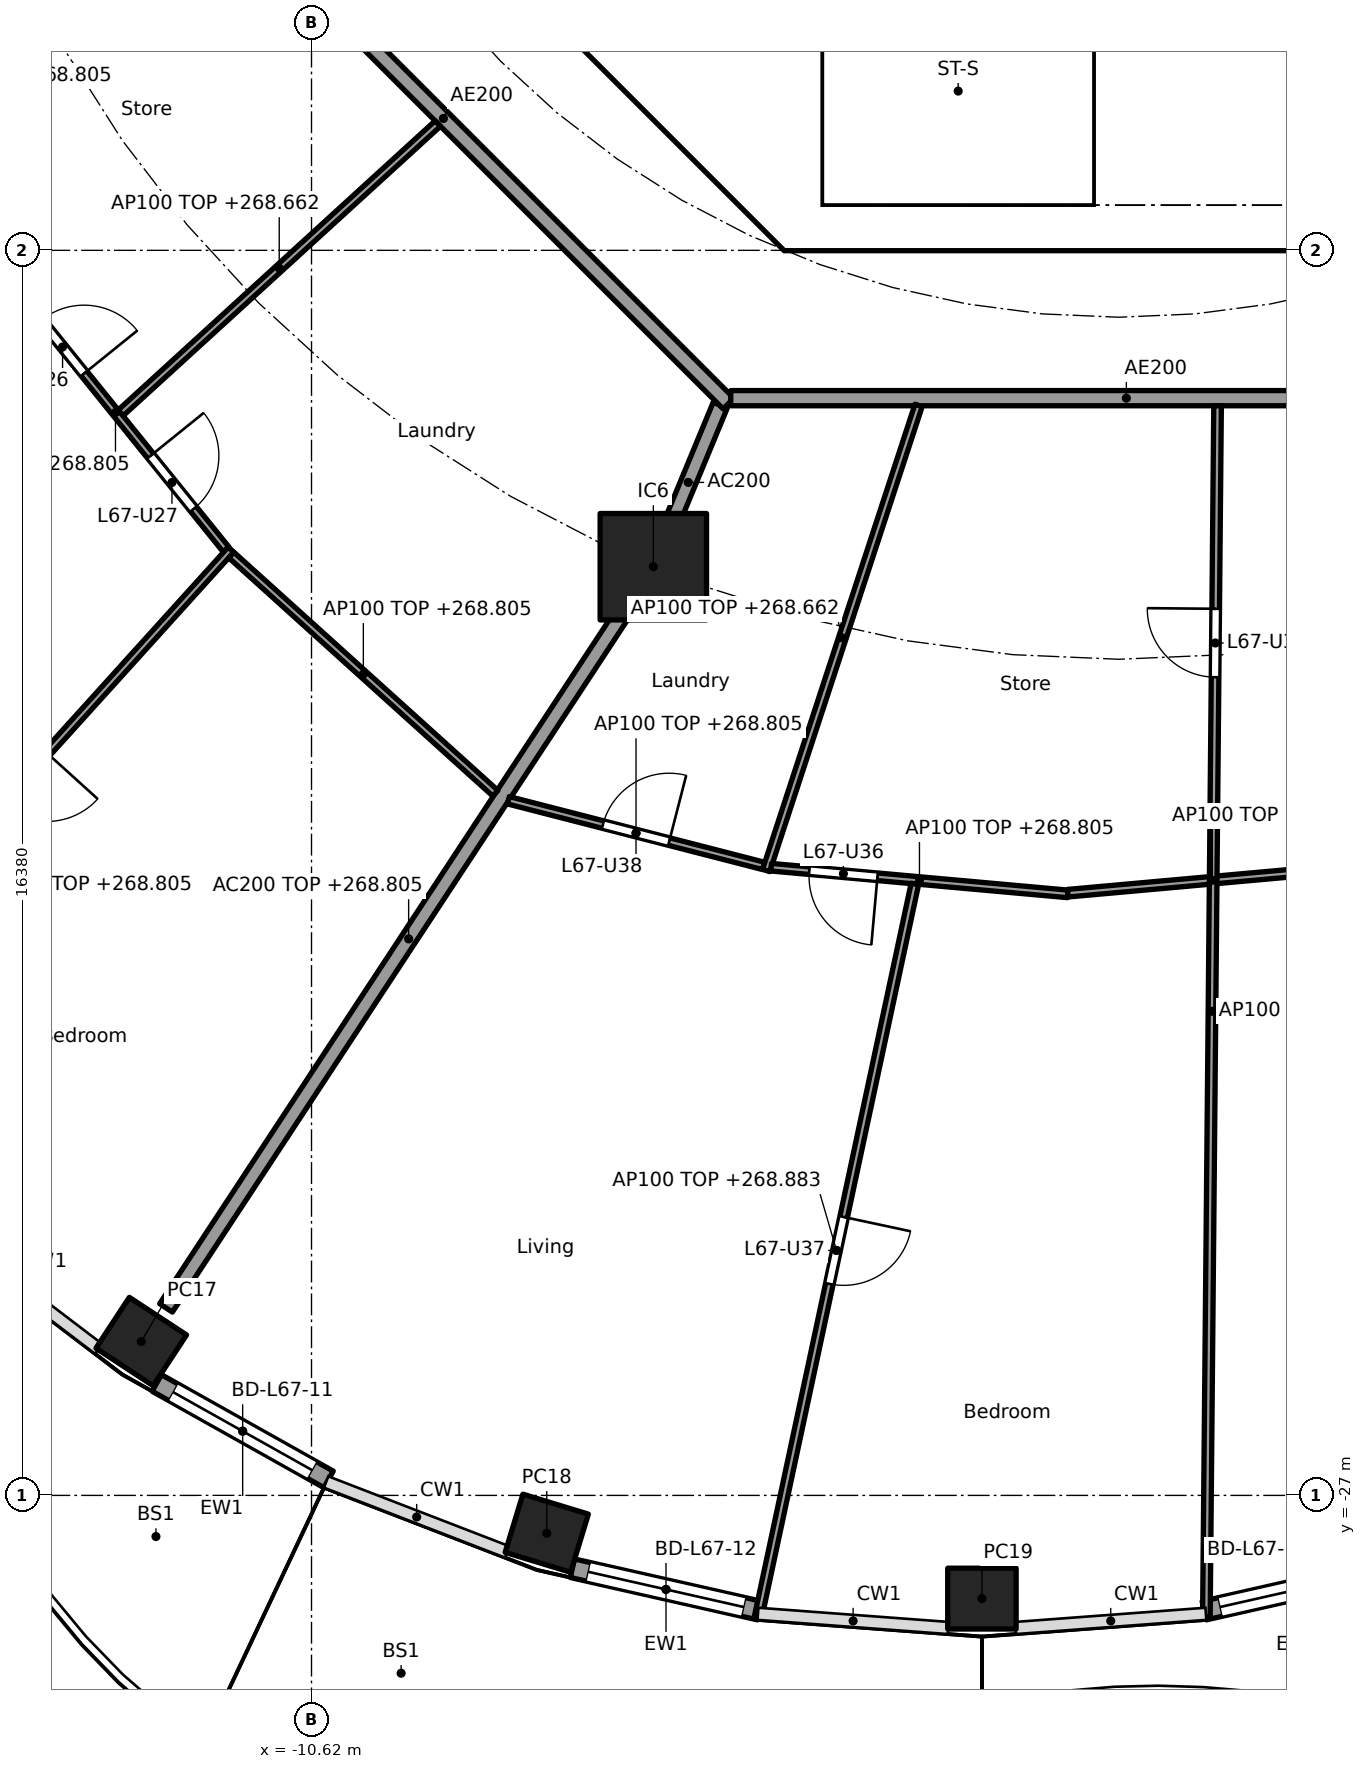
"""IFC4 building model, lengths in metres.
Left out: names, types, materials, properties, quantities, classifications, styles, units other than length and angle.
Written with IfcOpenShell. Run it as: python <this file> out.ifc"""

import sys

from ifc_helpers import new_model, si_unit, direction, frame, frame_2d, origin, origin_2d, place, context, subcontext, project, spatial, polyline, rectangle, hollow_rectangle, outline, extrude, element, fill, save


model = new_model("IFC4")
c1 = context("Model", 3, precision=1e-05, world=origin(), true_north=direction((0.0, 1.0)))
c2 = subcontext(c1, "Body", "Model", "MODEL_VIEW")
j1 = project(units=[si_unit("LENGTHUNIT", "METRE"), si_unit("PLANEANGLEUNIT", "RADIAN")], contexts=[c1])
p1 = place(None, origin())
s1 = spatial("IfcSite", under=j1, at=p1, CompositionType="ELEMENT")
p2 = place(p1, origin())
s2 = spatial("IfcBuilding", under=s1, at=p2, CompositionType="ELEMENT")
p3 = place(p2, frame((0.0, 0.0, 265.9)))
s3 = spatial("IfcBuildingStorey", under=s2, at=p3, CompositionType="ELEMENT", Elevation=265.9)
for number, where, z_axis, x_axis in (
    (1, (-12.86, -24.976, 0.0), (0.0, 0.0, 1.0), (0.836, -0.549, 0.0)),
    (2, (-7.525, -27.498, 0.0), (0.0, 0.0, 1.0), (0.957, -0.292, 0.0)),
    (3, (-1.8, -28.358, 0.0), (0.0, 0.0, 1.0), (1.0, 0.0, 0.0)),
):
    element("IfcColumn", number, at=place(p3, frame(where, z_axis=z_axis, x_axis=x_axis)), inside=s3, PredefinedType="COLUMN", context=c2, shape_type="SweptSolid", body=[
        extrude(hollow_rectangle(XDim=0.9, YDim=0.8, WallThickness=0.028, at=origin_2d()), origin(), (0.0, 0.0, 1.0), 3.7),
    ])
p4 = place(p3, frame((-6.123, -14.782, 0.0), z_axis=(0.0, 0.0, 1.0), x_axis=(1.0, 0.0, 0.0)))
e4 = element("IfcColumn", 4, at=p4, inside=s3, PredefinedType="COLUMN", context=c2, shape_type="SweptSolid", body=[
    extrude(rectangle(XDim=1.4, YDim=1.4, at=origin_2d()), origin(), (0.0, 0.0, 1.0), 3.7),
])
p5 = place(p3, frame((-10.395, -26.789, 0.0), z_axis=(0.0, 0.0, 1.0), x_axis=(-0.872115604046, 0.489299880625, 0.0)))
e5 = element("IfcWall", 5, at=p5, inside=s3, PredefinedType="SOLIDWALL", context=c2, shape_type="SweptSolid", body=[
    extrude(rectangle(XDim=2.593, YDim=0.25, at=frame_2d((1.296, 0.0))), origin(), (0.0, 0.0, 1.0), 3.44),
])
p6 = place(p5, frame((0.247, 0.0, 0.0)))
e6 = element("IfcOpeningElement", 6, at=p6, cuts=e5, PredefinedType="OPENING", context=c2, shape_type="SweptSolid", body=[
    extrude(rectangle(XDim=2.1, YDim=2.4, at=frame_2d((1.05, 1.2))), frame((0.0, 0.135, 0.0), z_axis=(0.0, -1.0, 0.0), x_axis=(1.0, 0.0, 0.0)), (0.0, 0.0, 1.0), 0.27),
])
p7 = place(p3, frame((-4.725, -28.516, 0.0), z_axis=(0.0, 0.0, 1.0), x_axis=(-0.975319584032, 0.220797891756, 0.0)))
e7 = element("IfcWall", 7, at=p7, inside=s3, PredefinedType="SOLIDWALL", context=c2, shape_type="SweptSolid", body=[
    extrude(rectangle(XDim=2.525, YDim=0.25, at=frame_2d((1.263, 0.0))), origin(), (0.0, 0.0, 1.0), 3.44),
])
p8 = place(p7, frame((0.213, 0.0, 0.0)))
e8 = element("IfcOpeningElement", 8, at=p8, cuts=e7, PredefinedType="OPENING", context=c2, shape_type="SweptSolid", body=[
    extrude(rectangle(XDim=2.1, YDim=2.4, at=frame_2d((1.05, 1.2))), frame((0.0, 0.135, 0.0), z_axis=(0.0, -1.0, 0.0), x_axis=(1.0, 0.0, 0.0)), (0.0, 0.0, 1.0), 0.27),
])
p9 = place(p3, frame((3.588, -27.958, 0.0), z_axis=(0.0, 0.0, 1.0), x_axis=(-0.97531487046, -0.22081871175, 0.0)))
e9 = element("IfcWall", 9, at=p9, inside=s3, PredefinedType="SOLIDWALL", context=c2, shape_type="SweptSolid", body=[
    extrude(rectangle(XDim=2.525, YDim=0.25, at=frame_2d((1.263, 0.0))), origin(), (0.0, 0.0, 1.0), 3.44),
])
p10 = place(p9, frame((0.213, 0.0, 0.0)))
e10 = element("IfcOpeningElement", 10, at=p10, cuts=e9, PredefinedType="OPENING", context=c2, shape_type="SweptSolid", body=[
    extrude(rectangle(XDim=2.1, YDim=2.4, at=frame_2d((1.05, 1.2))), frame((0.0, 0.135, 0.0), z_axis=(0.0, -1.0, 0.0), x_axis=(1.0, 0.0, 0.0)), (0.0, 0.0, 1.0), 0.27),
])
p11 = place(p3, frame((-9.988, -4.613, 0.0), z_axis=(0.0, 0.0, 1.0), x_axis=(0.707106781187, -0.707106781187, 0.0)))
e11 = element("IfcWall", 11, at=p11, inside=s3, PredefinedType="SHEAR", context=c2, shape_type="SweptSolid", body=[
    extrude(rectangle(XDim=7.602, YDim=0.6, at=frame_2d((3.801, 0.0))), origin(), (0.0, 0.0, 1.0), 3.44),
])
p12 = place(p11, frame((6.151, 0.0, 0.0)))
e12 = element("IfcOpeningElement", 12, at=p12, cuts=e11, PredefinedType="OPENING", context=c2, shape_type="SweptSolid", body=[
    extrude(rectangle(XDim=1.1, YDim=2.1, at=frame_2d((0.55, 1.05))), frame((0.0, 0.31, 0.0), z_axis=(0.0, -1.0, 0.0), x_axis=(1.0, 0.0, 0.0)), (0.0, 0.0, 1.0), 0.62),
])
p13 = place(p3, frame((-5.8, -8.227, 0.0), z_axis=(0.0, 0.0, 1.0), x_axis=(0.0, 1.0, 0.0)))
e13 = element("IfcWall", 13, at=p13, inside=s3, PredefinedType="PARTITIONING", context=c2, shape_type="SweptSolid", body=[
    extrude(rectangle(XDim=3.927, YDim=0.15, at=frame_2d((1.963, 0.0))), origin(), (0.0, 0.0, 1.0), 3.44),
])
p14 = place(p13, frame((2.615, 0.0, 0.0)))
e14 = element("IfcOpeningElement", 14, at=p14, cuts=e13, PredefinedType="OPENING", context=c2, shape_type="SweptSolid", body=[
    extrude(rectangle(XDim=0.9, YDim=2.1, at=frame_2d((0.45, 1.05))), frame((0.0, 0.085, 0.0), z_axis=(0.0, -1.0, 0.0), x_axis=(1.0, 0.0, 0.0)), (0.0, 0.0, 1.0), 0.17),
])
p15 = place(p13, frame((0.539, 0.0, 0.0)))
e15 = element("IfcOpeningElement", 15, at=p15, cuts=e13, PredefinedType="OPENING", context=c2, shape_type="SweptSolid", body=[
    extrude(rectangle(XDim=0.9, YDim=2.1, at=frame_2d((0.45, 1.05))), frame((0.0, 0.085, 0.0), z_axis=(0.0, -1.0, 0.0), x_axis=(1.0, 0.0, 0.0)), (0.0, 0.0, 1.0), 0.17),
])
p16 = place(p3, origin())
e16 = element("IfcWall", 16, at=p16, inside=s3, PredefinedType="SHEAR", context=c2, shape_type="SweptSolid", body=[
    extrude(outline(polyline([(-4.152, -10.025), (4.152, -10.025), (4.401, -9.776), (4.825, -10.2), (4.401, -10.625), (-4.401, -10.625), (-4.825, -10.2), (-4.401, -9.776), (-4.152, -10.025)])), origin(), (0.0, 0.0, 1.0), 3.44),
])
p17 = place(p3, origin())
e17 = element("IfcWall", 17, at=p17, inside=s3, PredefinedType="SOLIDWALL", context=c2, shape_type="SweptSolid", body=[
    extrude(outline(polyline([(-3.9, -10.025), (-4.1, -10.025), (-4.1, -7.025), (-3.9, -7.025), (-3.9, -10.025)])), origin(), (0.0, 0.0, 1.0), 3.44),
])
p18 = place(p3, frame((-5.243, -12.657, 0.0), z_axis=(0.0, 0.0, 1.0), x_axis=(-0.382770106157, -0.923843626288, 0.0)))
e18 = element("IfcWall", 18, at=p18, inside=s3, PredefinedType="PARTITIONING", context=c2, shape_type="SweptSolid", body=[
    extrude(rectangle(XDim=2.199, YDim=0.2, at=frame_2d((1.1, 0.0))), origin(), (0.0, 0.0, 1.0), 3.44),
])
p19 = place(p3, frame((-6.151, -14.824, 0.0), z_axis=(0.0, 0.0, 1.0), x_axis=(-0.549345577828, -0.835595258556, 0.0)))
e19 = element("IfcWall", 19, at=p19, inside=s3, PredefinedType="PARTITIONING", context=c2, shape_type="SweptSolid", body=[
    extrude(rectangle(XDim=11.62, YDim=0.2, at=frame_2d((5.81, 0.0))), origin(), (0.0, 0.0, 1.0), 2.905),
])
p20 = place(p3, frame((-12.635, -5.134, 0.0), z_axis=(0.0, 0.0, 1.0), x_axis=(0.707106781187, -0.707106781187, 0.0)))
e20 = element("IfcWall", 20, at=p20, inside=s3, PredefinedType="PARTITIONING", context=c2, shape_type="SweptSolid", body=[
    extrude(rectangle(XDim=10.609, YDim=0.2, at=frame_2d((5.305, 0.0))), origin(), (0.0, 0.0, 1.0), 3.44),
])
p21 = place(p3, frame((-5.104, -12.565, 0.0), z_axis=(0.0, 0.0, 1.0), x_axis=(1.0, 0.0, 0.0)))
e21 = element("IfcWall", 21, at=p21, inside=s3, PredefinedType="PARTITIONING", context=c2, shape_type="SweptSolid", body=[
    extrude(rectangle(XDim=10.409, YDim=0.2, at=frame_2d((5.205, 0.0))), origin(), (0.0, 0.0, 1.0), 3.44),
])
p22 = place(p3, frame((-14.654, -10.951, 0.0), z_axis=(0.0, 0.0, 1.0), x_axis=(0.62815308134, -0.778089780426, 0.0)))
e22 = element("IfcWall", 22, at=p22, inside=s3, PredefinedType="PARTITIONING", context=c2, shape_type="SweptSolid", body=[
    extrude(rectangle(XDim=4.633, YDim=0.1, at=frame_2d((2.316, 0.0))), origin(), (0.0, 0.0, 1.0), 2.905),
])
p23 = place(p22, frame((0.758, 0.0, 0.0)))
e23 = element("IfcOpeningElement", 23, at=p23, cuts=e22, PredefinedType="OPENING", context=c2, shape_type="SweptSolid", body=[
    extrude(rectangle(XDim=0.9, YDim=2.1, at=frame_2d((0.45, 1.05))), frame((0.0, 0.06, 0.0), z_axis=(0.0, -1.0, 0.0), x_axis=(1.0, 0.0, 0.0)), (0.0, 0.0, 1.0), 0.12),
])
p24 = place(p22, frame((3.049, 0.0, 0.0)))
e24 = element("IfcOpeningElement", 24, at=p24, cuts=e22, PredefinedType="OPENING", context=c2, shape_type="SweptSolid", body=[
    extrude(rectangle(XDim=0.9, YDim=2.1, at=frame_2d((0.45, 1.05))), frame((0.0, 0.06, 0.0), z_axis=(0.0, -1.0, 0.0), x_axis=(1.0, 0.0, 0.0)), (0.0, 0.0, 1.0), 0.12),
])
p25 = place(p3, frame((-8.958, -8.952, 0.0), z_axis=(0.0, 0.0, 1.0), x_axis=(-0.73876526954, -0.673962815385, 0.0)))
e25 = element("IfcWall", 25, at=p25, inside=s3, PredefinedType="PARTITIONING", context=c2, shape_type="SweptSolid", body=[
    extrude(rectangle(XDim=5.647, YDim=0.1, at=frame_2d((2.824, 0.0))), origin(), (0.0, 0.0, 1.0), 2.762),
])
p26 = place(p3, frame((-11.679, -14.557, 0.0), z_axis=(0.0, 0.0, 1.0), x_axis=(-0.670800011545, -0.741638284146, 0.0)))
e26 = element("IfcWall", 26, at=p26, inside=s3, PredefinedType="PARTITIONING", context=c2, shape_type="SweptSolid", body=[
    extrude(rectangle(XDim=8.068, YDim=0.1, at=frame_2d((4.034, 0.0))), origin(), (0.0, 0.0, 1.0), 2.905),
])
p27 = place(p26, frame((3.609, 0.0, 0.0)))
e27 = element("IfcOpeningElement", 27, at=p27, cuts=e26, PredefinedType="OPENING", context=c2, shape_type="SweptSolid", body=[
    extrude(rectangle(XDim=0.9, YDim=2.1, at=frame_2d((0.45, 1.05))), frame((0.0, 0.06, 0.0), z_axis=(0.0, -1.0, 0.0), x_axis=(1.0, 0.0, 0.0)), (0.0, 0.0, 1.0), 0.12),
])
p28 = place(p3, frame((-11.676, -14.628, 0.0), z_axis=(0.0, 0.0, 1.0), x_axis=(0.74245829867, -0.669892285921, 0.0)))
e28 = element("IfcWall", 28, at=p28, inside=s3, PredefinedType="PARTITIONING", context=c2, shape_type="SweptSolid", body=[
    extrude(rectangle(XDim=4.68, YDim=0.1, at=frame_2d((2.34, 0.0))), origin(), (0.0, 0.0, 1.0), 2.905),
])
p29 = place(p3, frame((-8.03, -17.854, 0.0), z_axis=(0.0, 0.0, 1.0), x_axis=(0.968441967324, -0.249239154077, 0.0)))
e29 = element("IfcWall", 29, at=p29, inside=s3, PredefinedType="PARTITIONING", context=c2, shape_type="SweptSolid", body=[
    extrude(rectangle(XDim=3.468, YDim=0.1, at=frame_2d((1.734, 0.0))), origin(), (0.0, 0.0, 1.0), 2.905),
])
p30 = place(p29, frame((1.284, 0.0, 0.0)))
e30 = element("IfcOpeningElement", 30, at=p30, cuts=e29, PredefinedType="OPENING", context=c2, shape_type="SweptSolid", body=[
    extrude(rectangle(XDim=0.9, YDim=2.1, at=frame_2d((0.45, 1.05))), frame((0.0, 0.06, 0.0), z_axis=(0.0, -1.0, 0.0), x_axis=(1.0, 0.0, 0.0)), (0.0, 0.0, 1.0), 0.12),
])
p31 = place(p3, frame((-2.633, -12.66, 0.0), z_axis=(0.0, 0.0, 1.0), x_axis=(-0.311435053715, -0.950267439891, 0.0)))
e31 = element("IfcWall", 31, at=p31, inside=s3, PredefinedType="PARTITIONING", context=c2, shape_type="SweptSolid", body=[
    extrude(rectangle(XDim=6.439, YDim=0.1, at=frame_2d((3.22, 0.0))), origin(), (0.0, 0.0, 1.0), 2.762),
])
p32 = place(p3, frame((-4.573, -18.736, 0.0), z_axis=(0.0, 0.0, 1.0), x_axis=(0.995984610732, -0.089524606594, 0.0)))
e32 = element("IfcWall", 32, at=p32, inside=s3, PredefinedType="PARTITIONING", context=c2, shape_type="SweptSolid", body=[
    extrude(rectangle(XDim=3.919, YDim=0.1, at=frame_2d((1.959, 0.0))), origin(), (0.0, 0.0, 1.0), 2.905),
])
p33 = place(p32, frame((0.505, 0.0, 0.0)))
e33 = element("IfcOpeningElement", 33, at=p33, cuts=e32, PredefinedType="OPENING", context=c2, shape_type="SweptSolid", body=[
    extrude(rectangle(XDim=0.9, YDim=2.1, at=frame_2d((0.45, 1.05))), frame((0.0, 0.06, 0.0), z_axis=(0.0, -1.0, 0.0), x_axis=(1.0, 0.0, 0.0)), (0.0, 0.0, 1.0), 0.12),
])
p34 = place(p3, frame((-2.682, -18.955, 0.0), z_axis=(0.0, 0.0, 1.0), x_axis=(-0.209106370979, -0.977892900892, 0.0)))
e34 = element("IfcWall", 34, at=p34, inside=s3, PredefinedType="PARTITIONING", context=c2, shape_type="SweptSolid", body=[
    extrude(rectangle(XDim=9.861, YDim=0.1, at=frame_2d((4.931, 0.0))), origin(), (0.0, 0.0, 1.0), 2.983),
])
p35 = place(p34, frame((4.48, 0.0, 0.0)))
e35 = element("IfcOpeningElement", 35, at=p35, cuts=e34, PredefinedType="OPENING", context=c2, shape_type="SweptSolid", body=[
    extrude(rectangle(XDim=0.9, YDim=2.1, at=frame_2d((0.45, 1.05))), frame((0.0, 0.06, 0.0), z_axis=(0.0, -1.0, 0.0), x_axis=(1.0, 0.0, 0.0)), (0.0, 0.0, 1.0), 0.12),
])
p36 = place(p3, frame((-0.67, -19.077, 0.0), z_axis=(0.0, 0.0, 1.0), x_axis=(0.995986472869, 0.089503887414, 0.0)))
e36 = element("IfcWall", 36, at=p36, inside=s3, PredefinedType="PARTITIONING", context=c2, shape_type="SweptSolid", body=[
    extrude(rectangle(XDim=3.819, YDim=0.1, at=frame_2d((1.909, 0.0))), origin(), (0.0, 0.0, 1.0), 2.905),
])
p37 = place(p3, frame((1.3, -12.665, 0.0), z_axis=(0.0, 0.0, 1.0), x_axis=(-0.009254890166, -0.999957172587, 0.0)))
e37 = element("IfcWall", 37, at=p37, inside=s3, PredefinedType="PARTITIONING", context=c2, shape_type="SweptSolid", body=[
    extrude(rectangle(XDim=15.933, YDim=0.1, at=frame_2d((7.967, 0.0))), origin(), (0.0, 0.0, 1.0), 2.762),
])
p38 = place(p37, frame((2.671, 0.0, 0.0)))
e38 = element("IfcOpeningElement", 38, at=p38, cuts=e37, PredefinedType="OPENING", context=c2, shape_type="SweptSolid", body=[
    extrude(rectangle(XDim=0.9, YDim=2.1, at=frame_2d((0.45, 1.05))), frame((0.0, 0.06, 0.0), z_axis=(0.0, -1.0, 0.0), x_axis=(1.0, 0.0, 0.0)), (0.0, 0.0, 1.0), 0.12),
])
p39 = place(p6, origin())
e39 = element("IfcDoor", 39, at=p39, inside=s3, OperationType="SLIDING_TO_LEFT", PredefinedType="DOOR", context=c2, shape_type="SweptSolid", body=[
    extrude(rectangle(XDim=2.1, YDim=2.4, at=frame_2d((1.05, 1.2))), frame((0.0, 0.025, 0.0), z_axis=(0.0, -1.0, 0.0), x_axis=(1.0, 0.0, 0.0)), (0.0, 0.0, 1.0), 0.05),
])
fill(e6, e39)
p40 = place(p8, origin())
e40 = element("IfcDoor", 40, at=p40, inside=s3, OperationType="SLIDING_TO_LEFT", PredefinedType="DOOR", context=c2, shape_type="SweptSolid", body=[
    extrude(rectangle(XDim=2.1, YDim=2.4, at=frame_2d((1.05, 1.2))), frame((0.0, 0.025, 0.0), z_axis=(0.0, -1.0, 0.0), x_axis=(1.0, 0.0, 0.0)), (0.0, 0.0, 1.0), 0.05),
])
fill(e8, e40)
p41 = place(p10, origin())
e41 = element("IfcDoor", 41, at=p41, inside=s3, OperationType="SLIDING_TO_LEFT", PredefinedType="DOOR", context=c2, shape_type="SweptSolid", body=[
    extrude(rectangle(XDim=2.1, YDim=2.4, at=frame_2d((1.05, 1.2))), frame((0.0, 0.025, 0.0), z_axis=(0.0, -1.0, 0.0), x_axis=(1.0, 0.0, 0.0)), (0.0, 0.0, 1.0), 0.05),
])
fill(e10, e41)
p42 = place(p12, origin())
e42 = element("IfcDoor", 42, at=p42, inside=s3, OperationType="SINGLE_SWING_RIGHT", PredefinedType="DOOR", context=c2, shape_type="SweptSolid", body=[
    extrude(rectangle(XDim=1.1, YDim=2.1, at=frame_2d((0.55, 1.05))), frame((0.0, 0.025, 0.0), z_axis=(0.0, -1.0, 0.0), x_axis=(1.0, 0.0, 0.0)), (0.0, 0.0, 1.0), 0.05),
])
fill(e12, e42)
p43 = place(p23, origin())
e43 = element("IfcDoor", 43, at=p43, inside=s3, OperationType="SINGLE_SWING_RIGHT", PredefinedType="DOOR", context=c2, shape_type="SweptSolid", body=[
    extrude(rectangle(XDim=0.9, YDim=2.1, at=frame_2d((0.45, 1.05))), frame((0.0, 0.025, 0.0), z_axis=(0.0, -1.0, 0.0), x_axis=(1.0, 0.0, 0.0)), (0.0, 0.0, 1.0), 0.05),
])
fill(e23, e43)
p44 = place(p24, origin())
e44 = element("IfcDoor", 44, at=p44, inside=s3, OperationType="SINGLE_SWING_LEFT", PredefinedType="DOOR", context=c2, shape_type="SweptSolid", body=[
    extrude(rectangle(XDim=0.9, YDim=2.1, at=frame_2d((0.45, 1.05))), frame((0.0, 0.025, 0.0), z_axis=(0.0, -1.0, 0.0), x_axis=(1.0, 0.0, 0.0)), (0.0, 0.0, 1.0), 0.05),
])
fill(e24, e44)
p45 = place(p38, frame((0.9, 0.0, 0.0), x_axis=(-1.0, 0.0, 0.0)))
e45 = element("IfcDoor", 45, at=p45, inside=s3, OperationType="SINGLE_SWING_RIGHT", PredefinedType="DOOR", context=c2, shape_type="SweptSolid", body=[
    extrude(rectangle(XDim=0.9, YDim=2.1, at=frame_2d((0.45, 1.05))), frame((0.0, 0.025, 0.0), z_axis=(0.0, -1.0, 0.0), x_axis=(1.0, 0.0, 0.0)), (0.0, 0.0, 1.0), 0.05),
])
fill(e38, e45)
p46 = place(p33, frame((0.9, 0.0, 0.0), x_axis=(-1.0, 0.0, 0.0)))
e46 = element("IfcDoor", 46, at=p46, inside=s3, OperationType="SINGLE_SWING_LEFT", PredefinedType="DOOR", context=c2, shape_type="SweptSolid", body=[
    extrude(rectangle(XDim=0.9, YDim=2.1, at=frame_2d((0.45, 1.05))), frame((0.0, 0.025, 0.0), z_axis=(0.0, -1.0, 0.0), x_axis=(1.0, 0.0, 0.0)), (0.0, 0.0, 1.0), 0.05),
])
fill(e33, e46)
p47 = place(p35, origin())
e47 = element("IfcDoor", 47, at=p47, inside=s3, OperationType="SINGLE_SWING_LEFT", PredefinedType="DOOR", context=c2, shape_type="SweptSolid", body=[
    extrude(rectangle(XDim=0.9, YDim=2.1, at=frame_2d((0.45, 1.05))), frame((0.0, 0.025, 0.0), z_axis=(0.0, -1.0, 0.0), x_axis=(1.0, 0.0, 0.0)), (0.0, 0.0, 1.0), 0.05),
])
fill(e35, e47)
p48 = place(p30, origin())
e48 = element("IfcDoor", 48, at=p48, inside=s3, OperationType="SINGLE_SWING_RIGHT", PredefinedType="DOOR", context=c2, shape_type="SweptSolid", body=[
    extrude(rectangle(XDim=0.9, YDim=2.1, at=frame_2d((0.45, 1.05))), frame((0.0, 0.025, 0.0), z_axis=(0.0, -1.0, 0.0), x_axis=(1.0, 0.0, 0.0)), (0.0, 0.0, 1.0), 0.05),
])
fill(e30, e48)
save(model, sys.argv[1])
